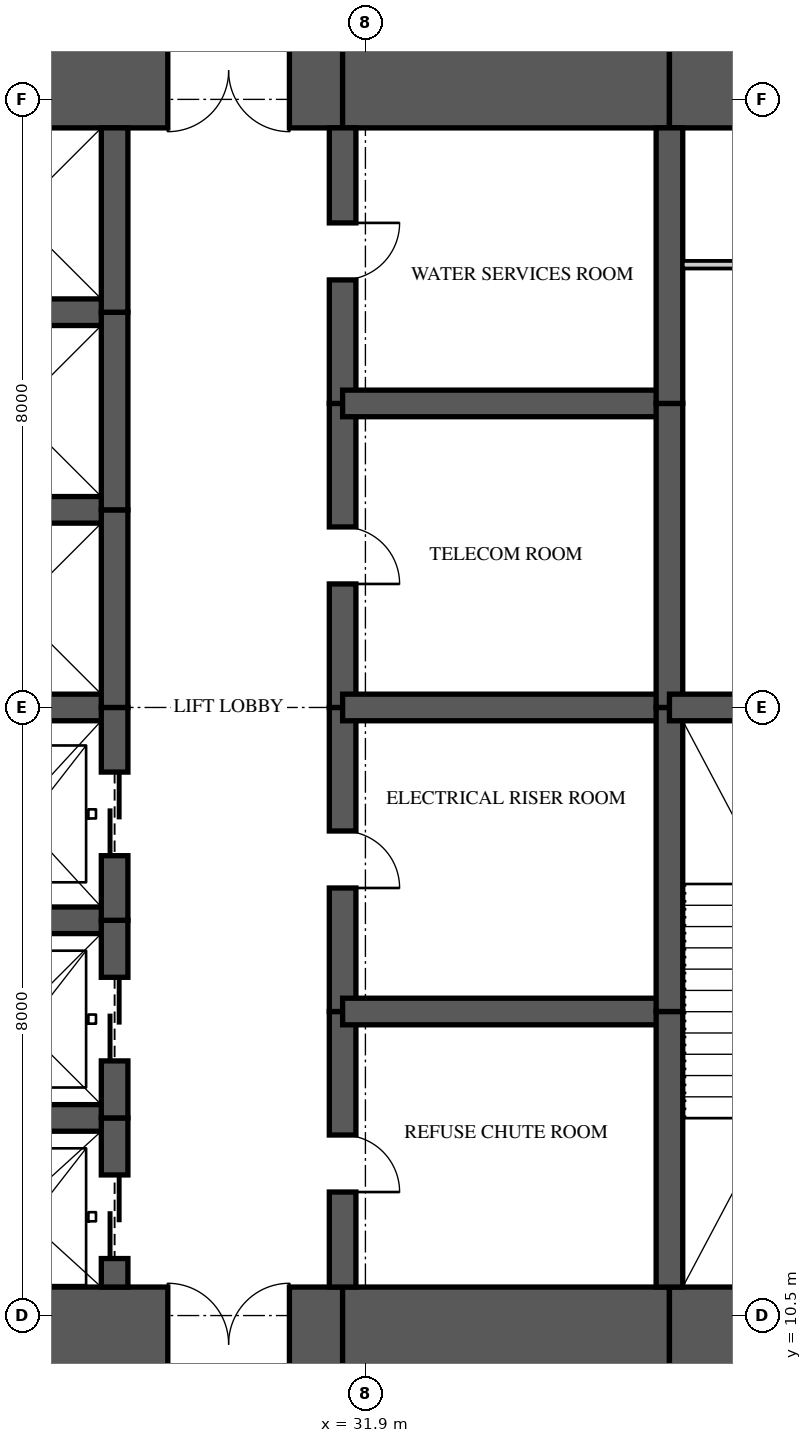
"""IFC4 building model, lengths in metres.
Left out: names, types, materials, properties, quantities, classifications, styles, units other than length and angle.
Written with IfcOpenShell. Run it as: python <this file> out.ifc"""

import sys

from ifc_helpers import new_model, si_unit, direction, frame, frame_2d, origin, place, context, subcontext, project, spatial, rectangle, extrude, element, fill, save


model = new_model("IFC4")
c1 = context("Model", 3, precision=1e-05, world=origin(), true_north=direction((0.0, 1.0)))
c2 = subcontext(c1, "Body", "Model", "MODEL_VIEW")
j1 = project(units=[si_unit("LENGTHUNIT", "METRE"), si_unit("PLANEANGLEUNIT", "RADIAN")], contexts=[c1])
p1 = place(None, origin())
s1 = spatial("IfcSite", under=j1, at=p1, CompositionType="ELEMENT")
p2 = place(p1, origin())
s2 = spatial("IfcBuilding", under=s1, at=p2, CompositionType="ELEMENT")
p3 = place(p2, frame((0.0, 0.0, 118.25)))
s3 = spatial("IfcBuildingStorey", under=s2, at=p3, CompositionType="ELEMENT", Elevation=118.25)
p4 = place(p3, frame((26.0, 10.125, 0.0), z_axis=(0.0, 0.0, 1.0), x_axis=(1.0, 0.0, 0.0)))
e1 = element("IfcWall", 1, at=p4, inside=s3, PredefinedType="SHEAR", context=c2, shape_type="SweptSolid", body=[
    extrude(rectangle(XDim=5.6, YDim=1.5, at=frame_2d((2.8, 0.0))), origin(), (0.0, 0.0, 1.0), 3.35),
])
p5 = place(p4, frame((3.3, 0.0, 0.0)))
e2 = element("IfcOpeningElement", 2, at=p5, cuts=e1, PredefinedType="OPENING", context=c2, shape_type="SweptSolid", body=[
    extrude(rectangle(XDim=1.6, YDim=2.1, at=frame_2d((0.8, 1.05))), frame((0.0, 0.76, 0.0), z_axis=(0.0, -1.0, 0.0), x_axis=(1.0, 0.0, 0.0)), (0.0, 0.0, 1.0), 1.52),
])
p6 = place(p3, frame((31.6, 10.125, 0.0), z_axis=(0.0, 0.0, 1.0), x_axis=(1.0, 0.0, 0.0)))
e3 = element("IfcWall", 3, at=p6, inside=s3, PredefinedType="SHEAR", context=c2, shape_type="SweptSolid", body=[
    extrude(rectangle(XDim=4.3, YDim=1.5, at=frame_2d((2.15, 0.0))), origin(), (0.0, 0.0, 1.0), 3.35),
])
p7 = place(p3, frame((35.9, 10.125, 0.0), z_axis=(0.0, 0.0, 1.0), x_axis=(1.0, 0.0, 0.0)))
e4 = element("IfcWall", 4, at=p7, inside=s3, PredefinedType="SHEAR", context=c2, shape_type="SweptSolid", body=[
    extrude(rectangle(XDim=8.325, YDim=1.5, at=frame_2d((4.163, 0.0))), origin(), (0.0, 0.0, 1.0), 3.35),
])
p8 = place(p7, frame((2.7, 0.0, 0.0)))
e5 = element("IfcOpeningElement", 5, at=p8, cuts=e4, PredefinedType="OPENING", context=c2, shape_type="SweptSolid", body=[
    extrude(rectangle(XDim=1.0, YDim=2.1, at=frame_2d((0.5, 1.05))), frame((0.0, 0.76, 0.0), z_axis=(0.0, -1.0, 0.0), x_axis=(1.0, 0.0, 0.0)), (0.0, 0.0, 1.0), 1.52),
])
p9 = place(p3, frame((44.225, 26.875, 0.0), z_axis=(0.0, 0.0, 1.0), x_axis=(-1.0, 0.0, 0.0)))
e6 = element("IfcWall", 6, at=p9, inside=s3, PredefinedType="SHEAR", context=c2, shape_type="SweptSolid", body=[
    extrude(rectangle(XDim=8.325, YDim=1.5, at=frame_2d((4.163, 0.0))), origin(), (0.0, 0.0, 1.0), 3.35),
])
p10 = place(p9, frame((5.725, 0.0, 0.0)))
e7 = element("IfcOpeningElement", 7, at=p10, cuts=e6, PredefinedType="OPENING", context=c2, shape_type="SweptSolid", body=[
    extrude(rectangle(XDim=0.9, YDim=2.1, at=frame_2d((0.45, 1.05))), frame((0.0, 0.76, 0.0), z_axis=(0.0, -1.0, 0.0), x_axis=(1.0, 0.0, 0.0)), (0.0, 0.0, 1.0), 1.52),
])
p11 = place(p3, frame((35.9, 26.875, 0.0), z_axis=(0.0, 0.0, 1.0), x_axis=(-1.0, 0.0, 0.0)))
e8 = element("IfcWall", 8, at=p11, inside=s3, PredefinedType="SHEAR", context=c2, shape_type="SweptSolid", body=[
    extrude(rectangle(XDim=4.3, YDim=1.5, at=frame_2d((2.15, 0.0))), origin(), (0.0, 0.0, 1.0), 3.35),
])
p12 = place(p3, frame((31.6, 26.875, 0.0), z_axis=(0.0, 0.0, 1.0), x_axis=(-1.0, 0.0, 0.0)))
e9 = element("IfcWall", 9, at=p12, inside=s3, PredefinedType="SHEAR", context=c2, shape_type="SweptSolid", body=[
    extrude(rectangle(XDim=5.6, YDim=1.5, at=frame_2d((2.8, 0.0))), origin(), (0.0, 0.0, 1.0), 3.35),
])
p13 = place(p12, frame((0.7, 0.0, 0.0)))
e10 = element("IfcOpeningElement", 10, at=p13, cuts=e9, PredefinedType="OPENING", context=c2, shape_type="SweptSolid", body=[
    extrude(rectangle(XDim=1.6, YDim=2.1, at=frame_2d((0.8, 1.05))), frame((0.0, 0.76, 0.0), z_axis=(0.0, -1.0, 0.0), x_axis=(1.0, 0.0, 0.0)), (0.0, 0.0, 1.0), 1.52),
])
p14 = place(p3, frame((28.6, 10.875, 0.0), z_axis=(0.0, 0.0, 1.0), x_axis=(0.0, 1.0, 0.0)))
e11 = element("IfcWall", 11, at=p14, inside=s3, PredefinedType="SHEAR", context=c2, shape_type="SweptSolid", body=[
    extrude(rectangle(XDim=2.225, YDim=0.35, at=frame_2d((1.113, 0.0))), origin(), (0.0, 0.0, 1.0), 3.35),
])
p15 = place(p14, frame((0.375, 0.0, 0.0)))
e12 = element("IfcOpeningElement", 12, at=p15, cuts=e11, PredefinedType="OPENING", context=c2, shape_type="SweptSolid", body=[
    extrude(rectangle(XDim=1.1, YDim=2.1, at=frame_2d((0.55, 1.05))), frame((0.0, 0.185, 0.0), z_axis=(0.0, -1.0, 0.0), x_axis=(1.0, 0.0, 0.0)), (0.0, 0.0, 1.0), 0.37),
])
p16 = place(p3, frame((28.6, 13.1, 0.0), z_axis=(0.0, 0.0, 1.0), x_axis=(0.0, 1.0, 0.0)))
e13 = element("IfcWall", 13, at=p16, inside=s3, PredefinedType="SHEAR", context=c2, shape_type="SweptSolid", body=[
    extrude(rectangle(XDim=2.6, YDim=0.35, at=frame_2d((1.3, 0.0))), origin(), (0.0, 0.0, 1.0), 3.35),
])
p17 = place(p16, frame((0.75, 0.0, 0.0)))
e14 = element("IfcOpeningElement", 14, at=p17, cuts=e13, PredefinedType="OPENING", context=c2, shape_type="SweptSolid", body=[
    extrude(rectangle(XDim=1.1, YDim=2.1, at=frame_2d((0.55, 1.05))), frame((0.0, 0.185, 0.0), z_axis=(0.0, -1.0, 0.0), x_axis=(1.0, 0.0, 0.0)), (0.0, 0.0, 1.0), 0.37),
])
p18 = place(p3, frame((28.6, 15.7, 0.0), z_axis=(0.0, 0.0, 1.0), x_axis=(0.0, 1.0, 0.0)))
e15 = element("IfcWall", 15, at=p18, inside=s3, PredefinedType="SHEAR", context=c2, shape_type="SweptSolid", body=[
    extrude(rectangle(XDim=2.8, YDim=0.35, at=frame_2d((1.4, 0.0))), origin(), (0.0, 0.0, 1.0), 3.35),
])
p19 = place(p18, frame((0.85, 0.0, 0.0)))
e16 = element("IfcOpeningElement", 16, at=p19, cuts=e15, PredefinedType="OPENING", context=c2, shape_type="SweptSolid", body=[
    extrude(rectangle(XDim=1.1, YDim=2.1, at=frame_2d((0.55, 1.05))), frame((0.0, 0.185, 0.0), z_axis=(0.0, -1.0, 0.0), x_axis=(1.0, 0.0, 0.0)), (0.0, 0.0, 1.0), 0.37),
])
p20 = place(p3, frame((28.6, 18.5, 0.0), z_axis=(0.0, 0.0, 1.0), x_axis=(0.0, 1.0, 0.0)))
e17 = element("IfcWall", 17, at=p20, inside=s3, PredefinedType="SHEAR", context=c2, shape_type="SweptSolid", body=[
    extrude(rectangle(XDim=2.6, YDim=0.35, at=frame_2d((1.3, 0.0))), origin(), (0.0, 0.0, 1.0), 3.35),
])
p21 = place(p3, frame((28.6, 21.1, 0.0), z_axis=(0.0, 0.0, 1.0), x_axis=(0.0, 1.0, 0.0)))
e18 = element("IfcWall", 18, at=p21, inside=s3, PredefinedType="SHEAR", context=c2, shape_type="SweptSolid", body=[
    extrude(rectangle(XDim=2.6, YDim=0.35, at=frame_2d((1.3, 0.0))), origin(), (0.0, 0.0, 1.0), 3.35),
])
p22 = place(p3, frame((28.6, 23.7, 0.0), z_axis=(0.0, 0.0, 1.0), x_axis=(0.0, 1.0, 0.0)))
e19 = element("IfcWall", 19, at=p22, inside=s3, PredefinedType="SHEAR", context=c2, shape_type="SweptSolid", body=[
    extrude(rectangle(XDim=2.425, YDim=0.35, at=frame_2d((1.212, 0.0))), origin(), (0.0, 0.0, 1.0), 3.35),
])
p23 = place(p3, frame((31.6, 10.875, 0.0), z_axis=(0.0, 0.0, 1.0), x_axis=(0.0, 1.0, 0.0)))
e20 = element("IfcWall", 20, at=p23, inside=s3, PredefinedType="SHEAR", context=c2, shape_type="SweptSolid", body=[
    extrude(rectangle(XDim=3.625, YDim=0.35, at=frame_2d((1.812, 0.0))), origin(), (0.0, 0.0, 1.0), 3.35),
])
p24 = place(p23, frame((1.25, 0.0, 0.0)))
e21 = element("IfcOpeningElement", 21, at=p24, cuts=e20, PredefinedType="OPENING", context=c2, shape_type="SweptSolid", body=[
    extrude(rectangle(XDim=0.75, YDim=2.1, at=frame_2d((0.375, 1.05))), frame((0.0, 0.185, 0.0), z_axis=(0.0, -1.0, 0.0), x_axis=(1.0, 0.0, 0.0)), (0.0, 0.0, 1.0), 0.37),
])
p25 = place(p3, frame((31.6, 14.5, 0.0), z_axis=(0.0, 0.0, 1.0), x_axis=(0.0, 1.0, 0.0)))
e22 = element("IfcWall", 22, at=p25, inside=s3, PredefinedType="SHEAR", context=c2, shape_type="SweptSolid", body=[
    extrude(rectangle(XDim=4.0, YDim=0.35, at=frame_2d((2.0, 0.0))), origin(), (0.0, 0.0, 1.0), 3.35),
])
p26 = place(p25, frame((1.625, 0.0, 0.0)))
e23 = element("IfcOpeningElement", 23, at=p26, cuts=e22, PredefinedType="OPENING", context=c2, shape_type="SweptSolid", body=[
    extrude(rectangle(XDim=0.75, YDim=2.1, at=frame_2d((0.375, 1.05))), frame((0.0, 0.185, 0.0), z_axis=(0.0, -1.0, 0.0), x_axis=(1.0, 0.0, 0.0)), (0.0, 0.0, 1.0), 0.37),
])
p27 = place(p3, frame((31.6, 18.5, 0.0), z_axis=(0.0, 0.0, 1.0), x_axis=(0.0, 1.0, 0.0)))
e24 = element("IfcWall", 24, at=p27, inside=s3, PredefinedType="SHEAR", context=c2, shape_type="SweptSolid", body=[
    extrude(rectangle(XDim=4.0, YDim=0.35, at=frame_2d((2.0, 0.0))), origin(), (0.0, 0.0, 1.0), 3.35),
])
p28 = place(p27, frame((1.625, 0.0, 0.0)))
e25 = element("IfcOpeningElement", 25, at=p28, cuts=e24, PredefinedType="OPENING", context=c2, shape_type="SweptSolid", body=[
    extrude(rectangle(XDim=0.75, YDim=2.1, at=frame_2d((0.375, 1.05))), frame((0.0, 0.185, 0.0), z_axis=(0.0, -1.0, 0.0), x_axis=(1.0, 0.0, 0.0)), (0.0, 0.0, 1.0), 0.37),
])
p29 = place(p3, frame((31.6, 22.5, 0.0), z_axis=(0.0, 0.0, 1.0), x_axis=(0.0, 1.0, 0.0)))
e26 = element("IfcWall", 26, at=p29, inside=s3, PredefinedType="SHEAR", context=c2, shape_type="SweptSolid", body=[
    extrude(rectangle(XDim=3.625, YDim=0.35, at=frame_2d((1.812, 0.0))), origin(), (0.0, 0.0, 1.0), 3.35),
])
p30 = place(p29, frame((1.625, 0.0, 0.0)))
e27 = element("IfcOpeningElement", 27, at=p30, cuts=e26, PredefinedType="OPENING", context=c2, shape_type="SweptSolid", body=[
    extrude(rectangle(XDim=0.75, YDim=2.1, at=frame_2d((0.375, 1.05))), frame((0.0, 0.185, 0.0), z_axis=(0.0, -1.0, 0.0), x_axis=(1.0, 0.0, 0.0)), (0.0, 0.0, 1.0), 0.37),
])
p31 = place(p3, frame((35.9, 10.875, 0.0), z_axis=(0.0, 0.0, 1.0), x_axis=(0.0, 1.0, 0.0)))
e28 = element("IfcWall", 28, at=p31, inside=s3, PredefinedType="SHEAR", context=c2, shape_type="SweptSolid", body=[
    extrude(rectangle(XDim=3.625, YDim=0.35, at=frame_2d((1.812, 0.0))), origin(), (0.0, 0.0, 1.0), 3.35),
])
for number, where, z_axis, x_axis in (
    (29, (35.9, 14.5, 0.0), (0.0, 0.0, 1.0), (0.0, 1.0, 0.0)),
    (30, (35.9, 18.5, 0.0), (0.0, 0.0, 1.0), (0.0, 1.0, 0.0)),
):
    element("IfcWall", number, at=place(p3, frame(where, z_axis=z_axis, x_axis=x_axis)), inside=s3, PredefinedType="SHEAR", context=c2, shape_type="SweptSolid", body=[
        extrude(rectangle(XDim=4.0, YDim=0.35, at=frame_2d((2.0, 0.0))), origin(), (0.0, 0.0, 1.0), 3.35),
    ])
p32 = place(p3, frame((35.9, 22.5, 0.0), z_axis=(0.0, 0.0, 1.0), x_axis=(0.0, 1.0, 0.0)))
e31 = element("IfcWall", 31, at=p32, inside=s3, PredefinedType="SHEAR", context=c2, shape_type="SweptSolid", body=[
    extrude(rectangle(XDim=3.625, YDim=0.35, at=frame_2d((1.812, 0.0))), origin(), (0.0, 0.0, 1.0), 3.35),
])
for number, where, z_axis, x_axis in (
    (32, (26.0, 13.1, 0.0), (0.0, 0.0, 1.0), (1.0, 0.0, 0.0)),
    (33, (26.0, 15.7, 0.0), (0.0, 0.0, 1.0), (1.0, 0.0, 0.0)),
    (34, (26.0, 18.5, 0.0), (0.0, 0.0, 1.0), (1.0, 0.0, 0.0)),
    (35, (26.0, 21.1, 0.0), (0.0, 0.0, 1.0), (1.0, 0.0, 0.0)),
    (36, (26.0, 23.7, 0.0), (0.0, 0.0, 1.0), (1.0, 0.0, 0.0)),
):
    element("IfcWall", number, at=place(p3, frame(where, z_axis=z_axis, x_axis=x_axis)), inside=s3, PredefinedType="SHEAR", context=c2, shape_type="SweptSolid", body=[
        extrude(rectangle(XDim=2.6, YDim=0.35, at=frame_2d((1.3, 0.0))), origin(), (0.0, 0.0, 1.0), 3.35),
    ])
for number, where, z_axis, x_axis in (
    (37, (31.6, 14.5, 0.0), (0.0, 0.0, 1.0), (1.0, 0.0, 0.0)),
    (38, (31.6, 18.5, 0.0), (0.0, 0.0, 1.0), (1.0, 0.0, 0.0)),
    (39, (31.6, 22.5, 0.0), (0.0, 0.0, 1.0), (1.0, 0.0, 0.0)),
):
    element("IfcWall", number, at=place(p3, frame(where, z_axis=z_axis, x_axis=x_axis)), inside=s3, PredefinedType="SHEAR", context=c2, shape_type="SweptSolid", body=[
        extrude(rectangle(XDim=4.3, YDim=0.35, at=frame_2d((2.15, 0.0))), origin(), (0.0, 0.0, 1.0), 3.35),
    ])
p33 = place(p3, frame((35.9, 18.5, 0.0), z_axis=(0.0, 0.0, 1.0), x_axis=(1.0, 0.0, 0.0)))
e40 = element("IfcWall", 40, at=p33, inside=s3, PredefinedType="SHEAR", context=c2, shape_type="SweptSolid", body=[
    extrude(rectangle(XDim=4.3, YDim=0.35, at=frame_2d((2.15, 0.0))), origin(), (0.0, 0.0, 1.0), 3.35),
])
p34 = place(p3, frame((36.075, 24.325, 0.0), z_axis=(0.0, 0.0, 1.0), x_axis=(1.0, 0.0, 0.0)))
e41 = element("IfcWall", 41, at=p34, inside=s3, PredefinedType="PARTITIONING", context=c2, shape_type="SweptSolid", body=[
    extrude(rectangle(XDim=3.95, YDim=0.1, at=frame_2d((1.975, 0.0))), origin(), (0.0, 0.0, 1.0), 3.11),
])
p35 = place(p34, frame((0.725, 0.0, 0.0)))
e42 = element("IfcOpeningElement", 42, at=p35, cuts=e41, PredefinedType="OPENING", context=c2, shape_type="SweptSolid", body=[
    extrude(rectangle(XDim=0.9, YDim=2.1, at=frame_2d((0.45, 1.05))), frame((0.0, 0.06, 0.0), z_axis=(0.0, -1.0, 0.0), x_axis=(1.0, 0.0, 0.0)), (0.0, 0.0, 1.0), 0.12),
])
p36 = place(p34, frame((2.7, 0.0, 0.0)))
e43 = element("IfcOpeningElement", 43, at=p36, cuts=e41, PredefinedType="OPENING", context=c2, shape_type="SweptSolid", body=[
    extrude(rectangle(XDim=0.9, YDim=2.1, at=frame_2d((0.45, 1.05))), frame((0.0, 0.06, 0.0), z_axis=(0.0, -1.0, 0.0), x_axis=(1.0, 0.0, 0.0)), (0.0, 0.0, 1.0), 0.12),
])
p37 = place(p15, origin())
e44 = element("IfcDoor", 44, at=p37, inside=s3, OperationType="SLIDING_TO_LEFT", PredefinedType="DOOR", context=c2, shape_type="SweptSolid", body=[
    extrude(rectangle(XDim=1.1, YDim=2.1, at=frame_2d((0.55, 1.05))), frame((0.0, 0.025, 0.0), z_axis=(0.0, -1.0, 0.0), x_axis=(1.0, 0.0, 0.0)), (0.0, 0.0, 1.0), 0.05),
])
fill(e12, e44)
p38 = place(p17, origin())
e45 = element("IfcDoor", 45, at=p38, inside=s3, OperationType="SLIDING_TO_LEFT", PredefinedType="DOOR", context=c2, shape_type="SweptSolid", body=[
    extrude(rectangle(XDim=1.1, YDim=2.1, at=frame_2d((0.55, 1.05))), frame((0.0, 0.025, 0.0), z_axis=(0.0, -1.0, 0.0), x_axis=(1.0, 0.0, 0.0)), (0.0, 0.0, 1.0), 0.05),
])
fill(e14, e45)
p39 = place(p19, origin())
e46 = element("IfcDoor", 46, at=p39, inside=s3, OperationType="SLIDING_TO_LEFT", PredefinedType="DOOR", context=c2, shape_type="SweptSolid", body=[
    extrude(rectangle(XDim=1.1, YDim=2.1, at=frame_2d((0.55, 1.05))), frame((0.0, 0.025, 0.0), z_axis=(0.0, -1.0, 0.0), x_axis=(1.0, 0.0, 0.0)), (0.0, 0.0, 1.0), 0.05),
])
fill(e16, e46)
p40 = place(p5, origin())
e47 = element("IfcDoor", 47, at=p40, inside=s3, OperationType="DOUBLE_DOOR_SINGLE_SWING", PredefinedType="DOOR", context=c2, shape_type="SweptSolid", body=[
    extrude(rectangle(XDim=1.6, YDim=2.1, at=frame_2d((0.8, 1.05))), frame((0.0, 0.025, 0.0), z_axis=(0.0, -1.0, 0.0), x_axis=(1.0, 0.0, 0.0)), (0.0, 0.0, 1.0), 0.05),
])
fill(e2, e47)
p41 = place(p13, origin())
e48 = element("IfcDoor", 48, at=p41, inside=s3, OperationType="DOUBLE_DOOR_SINGLE_SWING", PredefinedType="DOOR", context=c2, shape_type="SweptSolid", body=[
    extrude(rectangle(XDim=1.6, YDim=2.1, at=frame_2d((0.8, 1.05))), frame((0.0, 0.025, 0.0), z_axis=(0.0, -1.0, 0.0), x_axis=(1.0, 0.0, 0.0)), (0.0, 0.0, 1.0), 0.05),
])
fill(e10, e48)
p42 = place(p24, frame((0.75, 0.0, 0.0), z_axis=(0.0, 0.0, 1.0), x_axis=(-1.0, 0.0, 0.0)))
e49 = element("IfcDoor", 49, at=p42, inside=s3, OperationType="SINGLE_SWING_RIGHT", PredefinedType="DOOR", context=c2, shape_type="SweptSolid", body=[
    extrude(rectangle(XDim=0.75, YDim=2.1, at=frame_2d((0.375, 1.05))), frame((0.0, 0.025, 0.0), z_axis=(0.0, -1.0, 0.0), x_axis=(1.0, 0.0, 0.0)), (0.0, 0.0, 1.0), 0.05),
])
fill(e21, e49)
p43 = place(p26, frame((0.75, 0.0, 0.0), z_axis=(0.0, 0.0, 1.0), x_axis=(-1.0, 0.0, 0.0)))
e50 = element("IfcDoor", 50, at=p43, inside=s3, OperationType="SINGLE_SWING_RIGHT", PredefinedType="DOOR", context=c2, shape_type="SweptSolid", body=[
    extrude(rectangle(XDim=0.75, YDim=2.1, at=frame_2d((0.375, 1.05))), frame((0.0, 0.025, 0.0), z_axis=(0.0, -1.0, 0.0), x_axis=(1.0, 0.0, 0.0)), (0.0, 0.0, 1.0), 0.05),
])
fill(e23, e50)
p44 = place(p28, frame((0.75, 0.0, 0.0), z_axis=(0.0, 0.0, 1.0), x_axis=(-1.0, 0.0, 0.0)))
e51 = element("IfcDoor", 51, at=p44, inside=s3, OperationType="SINGLE_SWING_RIGHT", PredefinedType="DOOR", context=c2, shape_type="SweptSolid", body=[
    extrude(rectangle(XDim=0.75, YDim=2.1, at=frame_2d((0.375, 1.05))), frame((0.0, 0.025, 0.0), z_axis=(0.0, -1.0, 0.0), x_axis=(1.0, 0.0, 0.0)), (0.0, 0.0, 1.0), 0.05),
])
fill(e25, e51)
p45 = place(p30, frame((0.75, 0.0, 0.0), z_axis=(0.0, 0.0, 1.0), x_axis=(-1.0, 0.0, 0.0)))
e52 = element("IfcDoor", 52, at=p45, inside=s3, OperationType="SINGLE_SWING_LEFT", PredefinedType="DOOR", context=c2, shape_type="SweptSolid", body=[
    extrude(rectangle(XDim=0.75, YDim=2.1, at=frame_2d((0.375, 1.05))), frame((0.0, 0.025, 0.0), z_axis=(0.0, -1.0, 0.0), x_axis=(1.0, 0.0, 0.0)), (0.0, 0.0, 1.0), 0.05),
])
fill(e27, e52)
save(model, sys.argv[1])
